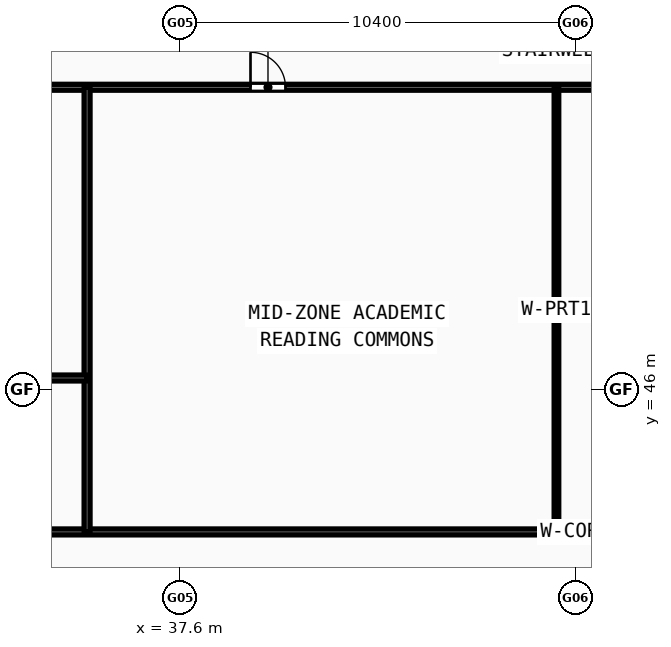
"""IFC4 building model, lengths in metres.
Left out: names, types, materials, properties, quantities, classifications, styles, units other than length and angle.
Written with IfcOpenShell. Run it as: python <this file> out.ifc"""

import sys

from ifc_helpers import new_model, si_unit, direction, frame, frame_2d, origin, origin_with_axes, place, context, subcontext, project, spatial, rectangle, extrude, source, transform, mapped, element, fill, save


model = new_model("IFC4")
c1 = context("Model", 3, precision=1e-05, world=origin(), true_north=direction((0.0, 1.0)))
c2 = subcontext(c1, "Body", "Model", "MODEL_VIEW")
j1 = project(units=[si_unit("LENGTHUNIT", "METRE"), si_unit("PLANEANGLEUNIT", "RADIAN")], contexts=[c1])
p1 = place(None, origin())
s1 = spatial("IfcSite", under=j1, at=p1, CompositionType="ELEMENT")
p2 = place(p1, origin())
s2 = spatial("IfcBuilding", under=s1, at=p2, CompositionType="ELEMENT")
p3 = place(p2, frame((0.0, 0.0, 151.91)))
s3 = spatial("IfcBuildingStorey", under=s2, at=p3, CompositionType="ELEMENT", Elevation=151.91)
p4 = place(p3, frame((31.45, 42.25, 0.0), z_axis=(0.0, 0.0, 1.0), x_axis=(1.0, 0.0, 0.0)))
e1 = element("IfcWall", 1, at=p4, inside=s3, PredefinedType="PARTITIONING", context=c2, shape_type="SweptSolid", body=[
    extrude(rectangle(XDim=33.1, YDim=0.155, at=frame_2d((16.55, 0.0))), origin(), (0.0, 0.0, 1.0), 2.77),
])
p5 = place(p3, frame((31.45, 53.95, 0.0), z_axis=(0.0, 0.0, 1.0), x_axis=(1.0, 0.0, 0.0)))
e2 = element("IfcWall", 2, at=p5, inside=s3, PredefinedType="PARTITIONING", context=c2, shape_type="SweptSolid", body=[
    extrude(rectangle(XDim=33.1, YDim=0.155, at=frame_2d((16.55, 0.0))), origin(), (0.0, 0.0, 1.0), 2.77),
])
p6 = place(p5, frame((8.0, 0.0, 0.0)))
e3 = element("IfcOpeningElement", 3, at=p6, cuts=e2, PredefinedType="OPENING", context=c2, shape_type="SweptSolid", body=[
    extrude(rectangle(XDim=0.92, YDim=2.1, at=frame_2d((0.46, 1.05))), frame((0.0, 0.087, 0.0), z_axis=(0.0, -1.0, 0.0), x_axis=(1.0, 0.0, 0.0)), (0.0, 0.0, 1.0), 0.175),
])
p7 = place(p5, frame((20.55, 0.0, 0.0)))
e4 = element("IfcOpeningElement", 4, at=p7, cuts=e2, PredefinedType="OPENING", context=c2, shape_type="SweptSolid", body=[
    extrude(rectangle(XDim=0.92, YDim=2.1, at=frame_2d((0.46, 1.05))), frame((0.0, 0.087, 0.0), z_axis=(0.0, -1.0, 0.0), x_axis=(1.0, 0.0, 0.0)), (0.0, 0.0, 1.0), 0.175),
])
p8 = place(p3, frame((35.15, 42.25, 0.0), z_axis=(0.0, 0.0, 1.0), x_axis=(0.0, 1.0, 0.0)))
e5 = element("IfcWall", 5, at=p8, inside=s3, PredefinedType="PARTITIONING", context=c2, shape_type="SweptSolid", body=[
    extrude(rectangle(XDim=11.7, YDim=0.155, at=frame_2d((5.85, 0.0))), origin(), (0.0, 0.0, 1.0), 2.77),
])
p9 = place(p3, frame((31.45, 46.3, 0.0), z_axis=(0.0, 0.0, 1.0), x_axis=(1.0, 0.0, 0.0)))
e6 = element("IfcWall", 6, at=p9, inside=s3, PredefinedType="PARTITIONING", context=c2, shape_type="SweptSolid", body=[
    extrude(rectangle(XDim=3.7, YDim=0.155, at=frame_2d((1.85, 0.0))), origin(), (0.0, 0.0, 1.0), 2.77),
])
p10 = place(p3, frame((47.5, 42.25, 0.0), z_axis=(0.0, 0.0, 1.0), x_axis=(0.0, 1.0, 0.0)))
e7 = element("IfcWall", 7, at=p10, inside=s3, PredefinedType="PARTITIONING", context=c2, shape_type="SweptSolid", body=[
    extrude(rectangle(XDim=11.7, YDim=0.12, at=frame_2d((5.85, 0.0))), origin(), (0.0, 0.0, 1.0), 3.02),
])
m1 = source(origin(), c2, "Body", "SweptSolid", [
    extrude(rectangle(XDim=0.92, YDim=2.1, at=frame_2d((0.46, 1.05))), frame((0.0, 0.025, 0.0), z_axis=(0.0, -1.0, 0.0), x_axis=(1.0, 0.0, 0.0)), (0.0, 0.0, 1.0), 0.05),
])
p11 = place(p6, origin_with_axes())
e8 = element("IfcDoor", 8, at=p11, inside=s3, OperationType="SINGLE_SWING_LEFT", PredefinedType="DOOR", context=c2, shape_type="MappedRepresentation", body=[
    mapped(m1, transform((0.0, 0.0, 0.0), scale=1.0)),
])
fill(e3, e8)
save(model, sys.argv[1])
